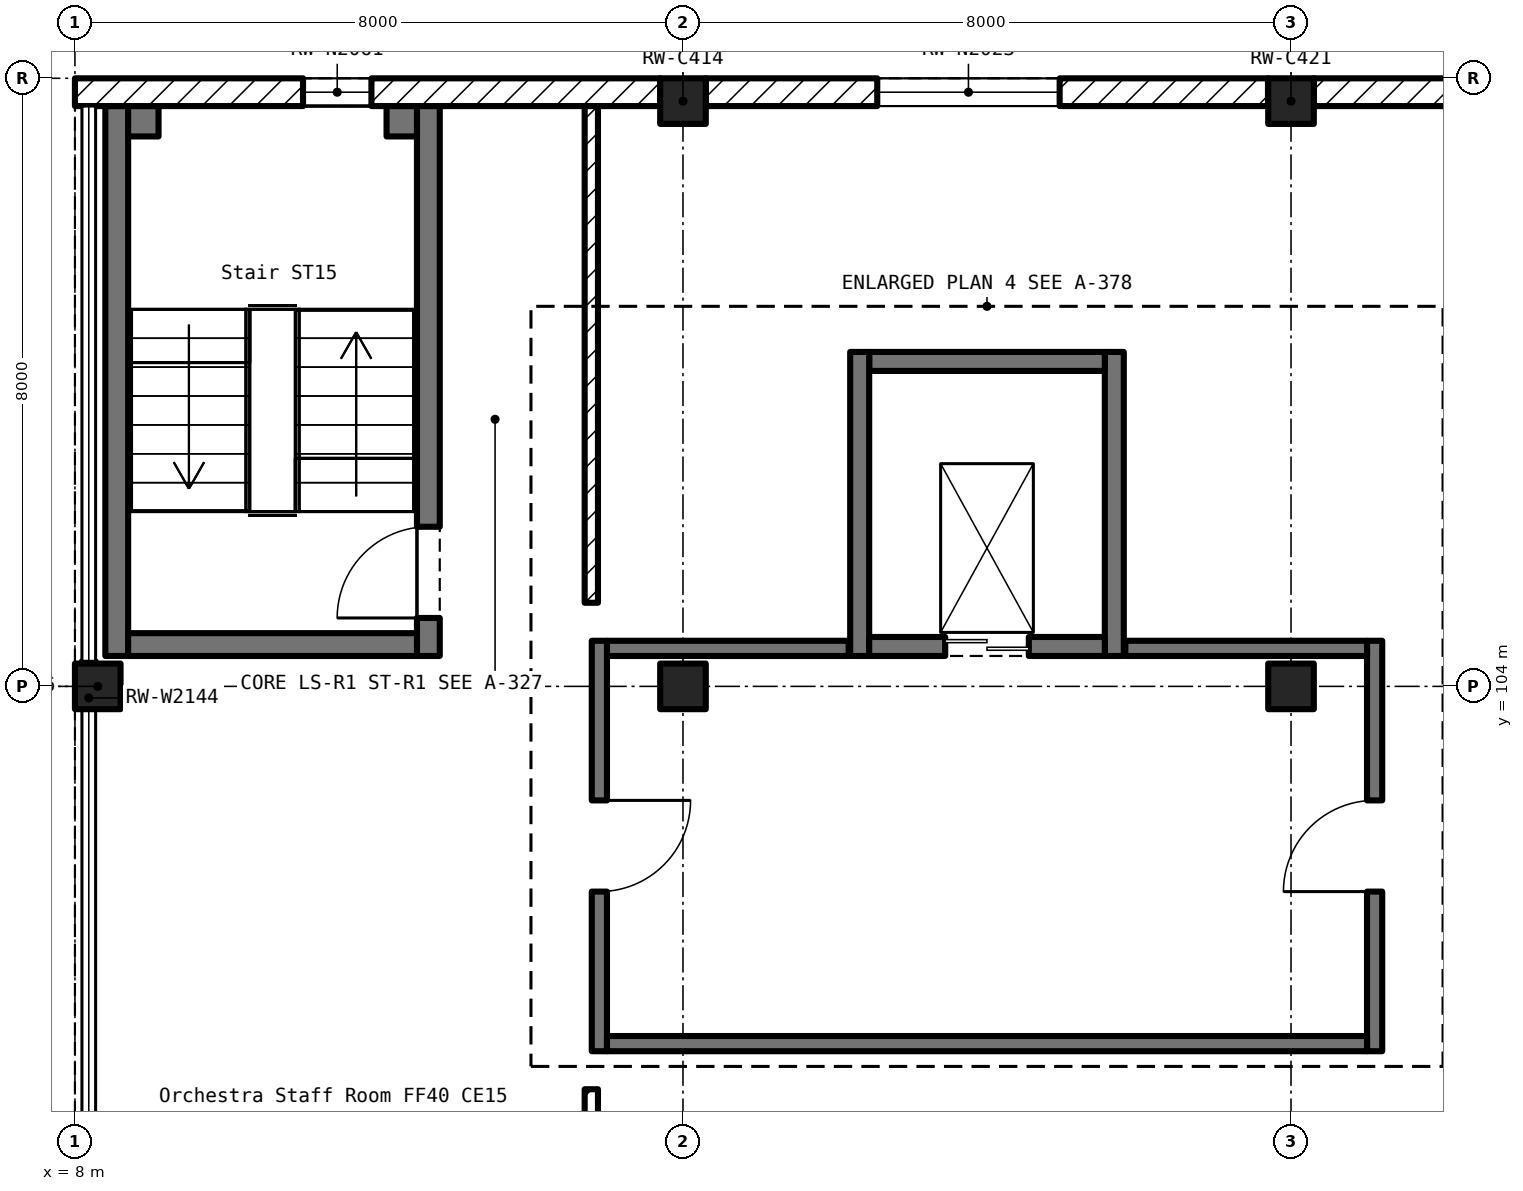
"""IFC4 building model, lengths in metres.
Left out: names, types, materials, properties, quantities, classifications, styles, units other than length and angle.
Written with IfcOpenShell. Run it as: python <this file> out.ifc"""

import sys

from ifc_helpers import new_model, si_unit, direction, frame, frame_2d, origin, origin_2d, place, context, subcontext, project, spatial, rectangle, extrude, element, fill, save


model = new_model("IFC4")
c1 = context("Model", 3, precision=1e-05, world=origin(), true_north=direction((0.0, 1.0)))
c2 = subcontext(c1, "Body", "Model", "MODEL_VIEW")
j1 = project(units=[si_unit("LENGTHUNIT", "METRE"), si_unit("PLANEANGLEUNIT", "RADIAN")], contexts=[c1])
p1 = place(None, origin())
s1 = spatial("IfcSite", under=j1, at=p1, CompositionType="ELEMENT")
p2 = place(p1, origin())
s2 = spatial("IfcBuilding", under=s1, at=p2, CompositionType="ELEMENT")
p3 = place(p2, frame((0.0, 0.0, 6.0)))
s3 = spatial("IfcBuildingStorey", under=s2, at=p3, CompositionType="ELEMENT", Elevation=6.0)
for number, where, z_axis, x_axis in (
    (1, (8.3, 104.0, 0.0), (0.0, 0.0, 1.0), (1.0, 0.0, 0.0)),
    (2, (16.0, 104.0, 0.0), (0.0, 0.0, 1.0), (1.0, 0.0, 0.0)),
    (3, (16.0, 111.7, 0.0), (0.0, 0.0, 1.0), (1.0, 0.0, 0.0)),
    (4, (24.0, 104.0, 0.0), (0.0, 0.0, 1.0), (1.0, 0.0, 0.0)),
    (5, (24.0, 111.7, 0.0), (0.0, 0.0, 1.0), (1.0, 0.0, 0.0)),
):
    element("IfcColumn", number, at=place(p3, frame(where, z_axis=z_axis, x_axis=x_axis)), inside=s3, PredefinedType="COLUMN", context=c2, shape_type="SweptSolid", body=[
        extrude(rectangle(XDim=0.6, YDim=0.6, at=origin_2d()), origin(), (0.0, 0.0, 1.0), 5.5),
    ])
p4 = place(p3, frame((30.817, 111.817, 0.0), z_axis=(0.0, 0.0, 1.0), x_axis=(-1.0, 0.0, 0.0)))
e6 = element("IfcWall", 6, at=p4, inside=s3, PredefinedType="SOLIDWALL", context=c2, shape_type="SweptSolid", body=[
    extrude(rectangle(XDim=6.517, YDim=0.365, at=frame_2d((3.258, 0.0))), origin(), (0.0, 0.0, 1.0), 4.55),
])
p5 = place(p4, frame((2.059, 0.0, 1.0)))
e7 = element("IfcOpeningElement", 7, at=p5, cuts=e6, PredefinedType="OPENING", context=c2, shape_type="SweptSolid", body=[
    extrude(rectangle(XDim=2.4, YDim=2.0, at=frame_2d((1.2, 1.0))), frame((0.0, 0.195, 0.0), z_axis=(0.0, -1.0, 0.0), x_axis=(1.0, 0.0, 0.0)), (0.0, 0.0, 1.0), 0.389),
])
p6 = place(p3, frame((23.697, 111.817, 0.0), z_axis=(0.0, 0.0, 1.0), x_axis=(-1.0, 0.0, 0.0)))
e8 = element("IfcWall", 8, at=p6, inside=s3, PredefinedType="SOLIDWALL", context=c2, shape_type="SweptSolid", body=[
    extrude(rectangle(XDim=7.397, YDim=0.365, at=frame_2d((3.698, 0.0))), origin(), (0.0, 0.0, 1.0), 4.55),
])
p7 = place(p6, frame((2.741, 0.0, 1.0)))
e9 = element("IfcOpeningElement", 9, at=p7, cuts=e8, PredefinedType="OPENING", context=c2, shape_type="SweptSolid", body=[
    extrude(rectangle(XDim=2.4, YDim=2.0, at=frame_2d((1.2, 1.0))), frame((0.0, 0.195, 0.0), z_axis=(0.0, -1.0, 0.0), x_axis=(1.0, 0.0, 0.0)), (0.0, 0.0, 1.0), 0.389),
])
p8 = place(p3, frame((15.701, 111.817, 0.0), z_axis=(0.0, 0.0, 1.0), x_axis=(-1.0, 0.0, 0.0)))
e10 = element("IfcWall", 10, at=p8, inside=s3, PredefinedType="SOLIDWALL", context=c2, shape_type="SweptSolid", body=[
    extrude(rectangle(XDim=7.701, YDim=0.365, at=frame_2d((3.851, 0.0))), origin(), (0.0, 0.0, 1.0), 4.55),
])
p9 = place(p8, frame((3.8, 0.0, 1.0)))
e11 = element("IfcOpeningElement", 11, at=p9, cuts=e10, PredefinedType="OPENING", context=c2, shape_type="SweptSolid", body=[
    extrude(rectangle(XDim=0.9, YDim=2.0, at=frame_2d((0.45, 1.0))), frame((0.0, 0.195, 0.0), z_axis=(0.0, -1.0, 0.0), x_axis=(1.0, 0.0, 0.0)), (0.0, 0.0, 1.0), 0.389),
])
p10 = place(p3, frame((12.65, 104.4, 0.0), z_axis=(0.0, 0.0, 1.0), x_axis=(0.0, 1.0, 0.0)))
e12 = element("IfcWall", 12, at=p10, inside=s3, PredefinedType="SOLIDWALL", context=c2, shape_type="SweptSolid", body=[
    extrude(rectangle(XDim=7.235, YDim=0.3, at=frame_2d((3.618, 0.0))), origin(), (0.0, 0.0, 1.0), 5.5),
])
p11 = place(p10, frame((0.5, 0.0, 0.0)))
e13 = element("IfcOpeningElement", 13, at=p11, cuts=e12, PredefinedType="OPENING", context=c2, shape_type="SweptSolid", body=[
    extrude(rectangle(XDim=1.2, YDim=2.1, at=frame_2d((0.6, 1.05))), frame((0.0, 0.162, 0.0), z_axis=(0.0, -1.0, 0.0), x_axis=(1.0, 0.0, 0.0)), (0.0, 0.0, 1.0), 0.324),
])
p12 = place(p3, frame((8.55, 111.635, 0.0), z_axis=(0.0, 0.0, 1.0), x_axis=(0.0, -1.0, 0.0)))
e14 = element("IfcWall", 14, at=p12, inside=s3, PredefinedType="SOLIDWALL", context=c2, shape_type="SweptSolid", body=[
    extrude(rectangle(XDim=7.235, YDim=0.3, at=frame_2d((3.618, 0.0))), origin(), (0.0, 0.0, 1.0), 5.5),
])
p13 = place(p3, frame((8.7, 104.55, 0.0), z_axis=(0.0, 0.0, 1.0), x_axis=(1.0, 0.0, 0.0)))
e15 = element("IfcWall", 15, at=p13, inside=s3, PredefinedType="SOLIDWALL", context=c2, shape_type="SweptSolid", body=[
    extrude(rectangle(XDim=3.8, YDim=0.3, at=frame_2d((1.9, 0.0))), origin(), (0.0, 0.0, 1.0), 5.5),
])
p14 = place(p3, frame((12.5, 111.435, 0.0), z_axis=(0.0, 0.0, 1.0), x_axis=(-1.0, 0.0, 0.0)))
e16 = element("IfcWall", 16, at=p14, inside=s3, PredefinedType="SOLIDWALL", context=c2, shape_type="SweptSolid", body=[
    extrude(rectangle(XDim=0.4, YDim=0.4, at=frame_2d((0.2, 0.0))), origin(), (0.0, 0.0, 1.0), 5.5),
])
p15 = place(p3, frame((9.1, 111.435, 0.0), z_axis=(0.0, 0.0, 1.0), x_axis=(-1.0, 0.0, 0.0)))
e17 = element("IfcWall", 17, at=p15, inside=s3, PredefinedType="SOLIDWALL", context=c2, shape_type="SweptSolid", body=[
    extrude(rectangle(XDim=0.4, YDim=0.4, at=frame_2d((0.2, 0.0))), origin(), (0.0, 0.0, 1.0), 5.5),
])
p16 = place(p3, frame((21.675, 104.4, 0.0), z_axis=(0.0, 0.0, 1.0), x_axis=(0.0, 1.0, 0.0)))
e18 = element("IfcWall", 18, at=p16, inside=s3, PredefinedType="SOLIDWALL", context=c2, shape_type="SweptSolid", body=[
    extrude(rectangle(XDim=4.0, YDim=0.25, at=frame_2d((2.0, 0.0))), origin(), (0.0, 0.0, 1.0), 5.5),
])
p17 = place(p3, frame((21.55, 108.275, 0.0), z_axis=(0.0, 0.0, 1.0), x_axis=(-1.0, 0.0, 0.0)))
e19 = element("IfcWall", 19, at=p17, inside=s3, PredefinedType="SOLIDWALL", context=c2, shape_type="SweptSolid", body=[
    extrude(rectangle(XDim=3.1, YDim=0.25, at=frame_2d((1.55, 0.0))), origin(), (0.0, 0.0, 1.0), 5.5),
])
p18 = place(p3, frame((18.325, 108.4, 0.0), z_axis=(0.0, 0.0, 1.0), x_axis=(0.0, -1.0, 0.0)))
e20 = element("IfcWall", 20, at=p18, inside=s3, PredefinedType="SOLIDWALL", context=c2, shape_type="SweptSolid", body=[
    extrude(rectangle(XDim=4.0, YDim=0.25, at=frame_2d((2.0, 0.0))), origin(), (0.0, 0.0, 1.0), 5.5),
])
p19 = place(p3, frame((18.45, 104.525, 0.0), z_axis=(0.0, 0.0, 1.0), x_axis=(1.0, 0.0, 0.0)))
e21 = element("IfcWall", 21, at=p19, inside=s3, PredefinedType="SOLIDWALL", context=c2, shape_type="SweptSolid", body=[
    extrude(rectangle(XDim=3.1, YDim=0.25, at=frame_2d((1.55, 0.0))), origin(), (0.0, 0.0, 1.0), 5.5),
])
p20 = place(p19, frame((1.0, 0.0, 0.0)))
e22 = element("IfcOpeningElement", 22, at=p20, cuts=e21, PredefinedType="OPENING", context=c2, shape_type="SweptSolid", body=[
    extrude(rectangle(XDim=1.1, YDim=2.1, at=frame_2d((0.55, 1.05))), frame((0.0, 0.137, 0.0), z_axis=(0.0, -1.0, 0.0), x_axis=(1.0, 0.0, 0.0)), (0.0, 0.0, 1.0), 0.274),
])
p21 = place(p3, frame((25.1, 99.2, 0.0), z_axis=(0.0, 0.0, 1.0), x_axis=(0.0, 1.0, 0.0)))
e23 = element("IfcWall", 23, at=p21, inside=s3, PredefinedType="PARTITIONING", context=c2, shape_type="SweptSolid", body=[
    extrude(rectangle(XDim=5.4, YDim=0.2, at=frame_2d((2.7, 0.0))), origin(), (0.0, 0.0, 1.0), 5.35),
])
p22 = place(p21, frame((2.1, 0.0, 0.0)))
e24 = element("IfcOpeningElement", 24, at=p22, cuts=e23, PredefinedType="OPENING", context=c2, shape_type="SweptSolid", body=[
    extrude(rectangle(XDim=1.2, YDim=2.1, at=frame_2d((0.6, 1.05))), frame((0.0, 0.112, 0.0), z_axis=(0.0, -1.0, 0.0), x_axis=(1.0, 0.0, 0.0)), (0.0, 0.0, 1.0), 0.224),
])
for number, where, z_axis, x_axis in (
    (25, (25.0, 104.5, 0.0), (0.0, 0.0, 1.0), (-1.0, 0.0, 0.0)),
    (26, (18.18, 104.5, 0.0), (0.0, 0.0, 1.0), (-1.0, 0.0, 0.0)),
):
    element("IfcWall", number, at=place(p3, frame(where, z_axis=z_axis, x_axis=x_axis)), inside=s3, PredefinedType="PARTITIONING", context=c2, shape_type="SweptSolid", body=[
        extrude(rectangle(XDim=3.18, YDim=0.2, at=frame_2d((1.59, 0.0))), origin(), (0.0, 0.0, 1.0), 5.35),
    ])
p23 = place(p3, frame((14.9, 104.6, 0.0), z_axis=(0.0, 0.0, 1.0), x_axis=(0.0, -1.0, 0.0)))
e27 = element("IfcWall", 27, at=p23, inside=s3, PredefinedType="PARTITIONING", context=c2, shape_type="SweptSolid", body=[
    extrude(rectangle(XDim=5.4, YDim=0.2, at=frame_2d((2.7, 0.0))), origin(), (0.0, 0.0, 1.0), 5.35),
])
p24 = place(p23, frame((2.1, 0.0, 0.0)))
e28 = element("IfcOpeningElement", 28, at=p24, cuts=e27, PredefinedType="OPENING", context=c2, shape_type="SweptSolid", body=[
    extrude(rectangle(XDim=1.2, YDim=2.1, at=frame_2d((0.6, 1.05))), frame((0.0, 0.112, 0.0), z_axis=(0.0, -1.0, 0.0), x_axis=(1.0, 0.0, 0.0)), (0.0, 0.0, 1.0), 0.224),
])
p25 = place(p3, frame((15.0, 99.3, 0.0), z_axis=(0.0, 0.0, 1.0), x_axis=(1.0, 0.0, 0.0)))
e29 = element("IfcWall", 29, at=p25, inside=s3, PredefinedType="PARTITIONING", context=c2, shape_type="SweptSolid", body=[
    extrude(rectangle(XDim=10.0, YDim=0.2, at=frame_2d((5.0, 0.0))), origin(), (0.0, 0.0, 1.0), 5.35),
])
p26 = place(p3, frame((14.794, 111.634, 0.0), z_axis=(0.0, 0.0, 1.0), x_axis=(0.0, -1.0, 0.0)))
e30 = element("IfcWall", 30, at=p26, inside=s3, PredefinedType="PARTITIONING", context=c2, shape_type="SweptSolid", body=[
    extrude(rectangle(XDim=6.534, YDim=0.175, at=frame_2d((3.267, 0.0))), origin(), (0.0, 0.0, 1.0), 4.45),
])
p27 = place(p3, frame((14.794, 98.7, 0.0), z_axis=(0.0, 0.0, 1.0), x_axis=(0.0, -1.0, 0.0)))
e31 = element("IfcWall", 31, at=p27, inside=s3, PredefinedType="PARTITIONING", context=c2, shape_type="SweptSolid", body=[
    extrude(rectangle(XDim=8.5, YDim=0.175, at=frame_2d((4.25, 0.0))), origin(), (0.0, 0.0, 1.0), 4.45),
])
p28 = place(p3, frame((8.182, 104.33, 0.0), z_axis=(0.0, 0.0, 1.0), x_axis=(0.0, -1.0, 0.0)))
e32 = element("IfcWall", 32, at=p28, inside=s3, PredefinedType="SOLIDWALL", context=c2, shape_type="SweptSolid", body=[
    extrude(rectangle(XDim=0.305, YDim=0.18, at=frame_2d((0.153, 0.0))), origin(), (0.0, 0.0, 1.0), 3.7),
])
p29 = place(p3, frame((8.182, 103.696, 0.0), z_axis=(0.0, 0.0, 1.0), x_axis=(0.0, 1.0, 0.0)))
e33 = element("IfcWall", 33, at=p29, inside=s3, PredefinedType="SOLIDWALL", context=c2, shape_type="SweptSolid", body=[
    extrude(rectangle(XDim=0.305, YDim=0.18, at=frame_2d((0.152, 0.0))), origin(), (0.0, 0.0, 1.0), 3.7),
])
p30 = place(p7, origin())
e34 = element("IfcWindow", 34, at=p30, inside=s3, PartitioningType="DOUBLE_PANEL_VERTICAL", PredefinedType="WINDOW", context=c2, shape_type="SweptSolid", body=[
    extrude(rectangle(XDim=2.4, YDim=2.0, at=frame_2d((1.2, 1.0))), frame((0.0, 0.03, 0.0), z_axis=(0.0, -1.0, 0.0), x_axis=(1.0, 0.0, 0.0)), (0.0, 0.0, 1.0), 0.06),
])
fill(e9, e34)
p31 = place(p11, origin())
e35 = element("IfcDoor", 35, at=p31, inside=s3, OperationType="SINGLE_SWING_LEFT", PredefinedType="DOOR", context=c2, shape_type="SweptSolid", body=[
    extrude(rectangle(XDim=1.2, YDim=2.1, at=frame_2d((0.6, 1.05))), frame((0.0, 0.025, 0.0), z_axis=(0.0, -1.0, 0.0), x_axis=(1.0, 0.0, 0.0)), (0.0, 0.0, 1.0), 0.05),
])
fill(e13, e35)
p32 = place(p20, origin())
e36 = element("IfcDoor", 36, at=p32, inside=s3, OperationType="DOUBLE_DOOR_SLIDING", PredefinedType="DOOR", context=c2, shape_type="SweptSolid", body=[
    extrude(rectangle(XDim=1.1, YDim=2.1, at=frame_2d((0.55, 1.05))), frame((0.0, 0.025, 0.0), z_axis=(0.0, -1.0, 0.0), x_axis=(1.0, 0.0, 0.0)), (0.0, 0.0, 1.0), 0.05),
])
fill(e22, e36)
p33 = place(p22, origin())
e37 = element("IfcDoor", 37, at=p33, inside=s3, OperationType="SINGLE_SWING_LEFT", PredefinedType="DOOR", context=c2, shape_type="SweptSolid", body=[
    extrude(rectangle(XDim=1.2, YDim=2.1, at=frame_2d((0.6, 1.05))), frame((0.0, 0.025, 0.0), z_axis=(0.0, -1.0, 0.0), x_axis=(1.0, 0.0, 0.0)), (0.0, 0.0, 1.0), 0.05),
])
fill(e24, e37)
p34 = place(p24, origin())
e38 = element("IfcDoor", 38, at=p34, inside=s3, OperationType="SINGLE_SWING_LEFT", PredefinedType="DOOR", context=c2, shape_type="SweptSolid", body=[
    extrude(rectangle(XDim=1.2, YDim=2.1, at=frame_2d((0.6, 1.05))), frame((0.0, 0.025, 0.0), z_axis=(0.0, -1.0, 0.0), x_axis=(1.0, 0.0, 0.0)), (0.0, 0.0, 1.0), 0.05),
])
fill(e28, e38)
p35 = place(p9, origin())
e39 = element("IfcWindow", 39, at=p35, inside=s3, PartitioningType="SINGLE_PANEL", PredefinedType="WINDOW", context=c2, shape_type="SweptSolid", body=[
    extrude(rectangle(XDim=0.9, YDim=2.0, at=frame_2d((0.45, 1.0))), frame((0.0, 0.03, 0.0), z_axis=(0.0, -1.0, 0.0), x_axis=(1.0, 0.0, 0.0)), (0.0, 0.0, 1.0), 0.06),
])
fill(e11, e39)
save(model, sys.argv[1])
